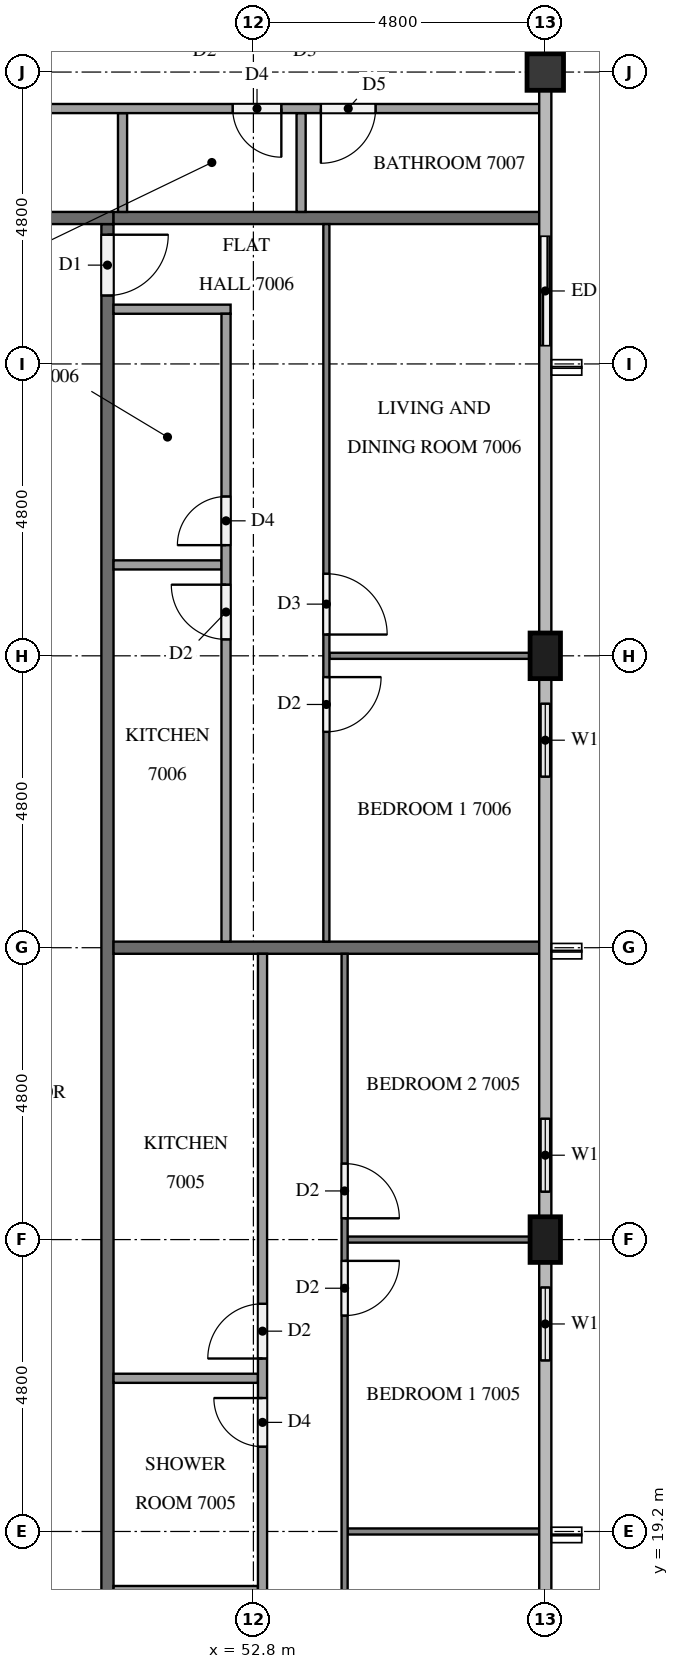
"""IFC4 building model, lengths in metres.
Left out: names, types, materials, properties, quantities, classifications, styles, units other than length and angle.
Written with IfcOpenShell. Run it as: python <this file> out.ifc"""

import sys

from ifc_helpers import new_model, si_unit, direction, frame, frame_2d, origin, origin_2d, place, context, subcontext, project, spatial, rectangle, extrude, element, fill, save


model = new_model("IFC4")
c1 = context("Model", 3, precision=1e-05, world=origin(), true_north=direction((0.0, 1.0)))
c2 = subcontext(c1, "Body", "Model", "MODEL_VIEW")
j1 = project(units=[si_unit("LENGTHUNIT", "METRE"), si_unit("PLANEANGLEUNIT", "RADIAN")], contexts=[c1])
p1 = place(None, origin())
s1 = spatial("IfcSite", under=j1, at=p1, CompositionType="ELEMENT")
p2 = place(p1, origin())
s2 = spatial("IfcBuilding", under=s1, at=p2, CompositionType="ELEMENT")
p3 = place(p2, frame((0.0, 0.0, 268.6)))
s3 = spatial("IfcBuildingStorey", under=s2, at=p3, CompositionType="ELEMENT", Elevation=268.6)
for number, where, z_axis, x_axis in (
    (1, (57.6, 24.0, 0.0), (0.0, 0.0, 1.0), (0.0, 1.0, 0.0)),
    (2, (57.6, 33.6, 0.0), (0.0, 0.0, 1.0), (0.0, 1.0, 0.0)),
):
    element("IfcColumn", number, at=place(p3, frame(where, z_axis=z_axis, x_axis=x_axis)), inside=s3, PredefinedType="COLUMN", context=c2, shape_type="SweptSolid", body=[
        extrude(rectangle(XDim=0.75, YDim=0.5, at=origin_2d()), origin(), (0.0, 0.0, 1.0), 3.2),
    ])
p4 = place(p3, frame((57.6, 43.2, 0.0), z_axis=(0.0, 0.0, 1.0), x_axis=(1.0, 0.0, 0.0)))
e3 = element("IfcColumn", 3, at=p4, inside=s3, PredefinedType="COLUMN", context=c2, shape_type="SweptSolid", body=[
    extrude(rectangle(XDim=0.6, YDim=0.6, at=origin_2d()), origin(), (0.0, 0.0, 1.0), 3.2),
])
p5 = place(p3, frame((57.6, 21.6, 0.0), z_axis=(0.0, 0.0, 1.0), x_axis=(0.0, 1.0, 0.0)))
e4 = element("IfcWall", 4, at=p5, inside=s3, PredefinedType="SOLIDWALL", context=c2, shape_type="SweptSolid", body=[
    extrude(rectangle(XDim=2.025, YDim=0.15, at=frame_2d((1.012, 0.0))), origin(), (0.0, 0.0, 1.0), 3.2),
])
p6 = place(p5, frame((0.413, 0.0, 0.9)))
e5 = element("IfcOpeningElement", 5, at=p6, cuts=e4, PredefinedType="OPENING", context=c2, shape_type="SweptSolid", body=[
    extrude(rectangle(XDim=1.2, YDim=1.4, at=frame_2d((0.6, 0.7))), frame((0.0, 0.085, 0.0), z_axis=(0.0, -1.0, 0.0), x_axis=(1.0, 0.0, 0.0)), (0.0, 0.0, 1.0), 0.17),
])
p7 = place(p3, frame((57.6, 24.375, 0.0), z_axis=(0.0, 0.0, 1.0), x_axis=(0.0, 1.0, 0.0)))
e6 = element("IfcWall", 6, at=p7, inside=s3, PredefinedType="SOLIDWALL", context=c2, shape_type="SweptSolid", body=[
    extrude(rectangle(XDim=2.025, YDim=0.15, at=frame_2d((1.012, 0.0))), origin(), (0.0, 0.0, 1.0), 3.2),
])
p8 = place(p7, frame((0.413, 0.0, 0.9)))
e7 = element("IfcOpeningElement", 7, at=p8, cuts=e6, PredefinedType="OPENING", context=c2, shape_type="SweptSolid", body=[
    extrude(rectangle(XDim=1.2, YDim=1.4, at=frame_2d((0.6, 0.7))), frame((0.0, 0.085, 0.0), z_axis=(0.0, -1.0, 0.0), x_axis=(1.0, 0.0, 0.0)), (0.0, 0.0, 1.0), 0.17),
])
p9 = place(p3, frame((57.6, 31.2, 0.0), z_axis=(0.0, 0.0, 1.0), x_axis=(0.0, 1.0, 0.0)))
e8 = element("IfcWall", 8, at=p9, inside=s3, PredefinedType="SOLIDWALL", context=c2, shape_type="SweptSolid", body=[
    extrude(rectangle(XDim=2.025, YDim=0.15, at=frame_2d((1.013, 0.0))), origin(), (0.0, 0.0, 1.0), 3.2),
])
p10 = place(p9, frame((0.413, 0.0, 0.9)))
e9 = element("IfcOpeningElement", 9, at=p10, cuts=e8, PredefinedType="OPENING", context=c2, shape_type="SweptSolid", body=[
    extrude(rectangle(XDim=1.2, YDim=1.4, at=frame_2d((0.6, 0.7))), frame((0.0, 0.085, 0.0), z_axis=(0.0, -1.0, 0.0), x_axis=(1.0, 0.0, 0.0)), (0.0, 0.0, 1.0), 0.17),
])
p11 = place(p3, frame((57.6, 38.4, 0.0), z_axis=(0.0, 0.0, 1.0), x_axis=(0.0, 1.0, 0.0)))
e10 = element("IfcWall", 10, at=p11, inside=s3, PredefinedType="SOLIDWALL", context=c2, shape_type="SweptSolid", body=[
    extrude(rectangle(XDim=2.4, YDim=0.15, at=frame_2d((1.2, 0.0))), origin(), (0.0, 0.0, 1.0), 3.2),
])
p12 = place(p11, frame((0.3, 0.0, 0.0)))
e11 = element("IfcOpeningElement", 11, at=p12, cuts=e10, PredefinedType="OPENING", context=c2, shape_type="SweptSolid", body=[
    extrude(rectangle(XDim=1.8, YDim=2.4, at=frame_2d((0.9, 1.2))), frame((0.0, 0.085, 0.0), z_axis=(0.0, -1.0, 0.0), x_axis=(1.0, 0.0, 0.0)), (0.0, 0.0, 1.0), 0.17),
])
p13 = place(p3, frame((50.4, 40.7, 0.0), z_axis=(0.0, 0.0, 1.0), x_axis=(0.0, -1.0, 0.0)))
e12 = element("IfcWall", 12, at=p13, inside=s3, PredefinedType="PARTITIONING", context=c2, shape_type="SweptSolid", body=[
    extrude(rectangle(XDim=28.6, YDim=0.2, at=frame_2d((14.3, 0.0))), origin(), (0.0, 0.0, 1.0), 3.2),
])
p14 = place(p13, frame((27.425, 0.0, 0.0)))
e13 = element("IfcOpeningElement", 13, at=p14, cuts=e12, PredefinedType="OPENING", context=c2, shape_type="SweptSolid", body=[
    extrude(rectangle(XDim=1.0, YDim=2.1, at=frame_2d((0.5, 1.05))), frame((0.0, 0.11, 0.0), z_axis=(0.0, -1.0, 0.0), x_axis=(1.0, 0.0, 0.0)), (0.0, 0.0, 1.0), 0.22),
])
p15 = place(p13, frame((0.175, 0.0, 0.0)))
e14 = element("IfcOpeningElement", 14, at=p15, cuts=e12, PredefinedType="OPENING", context=c2, shape_type="SweptSolid", body=[
    extrude(rectangle(XDim=1.0, YDim=2.1, at=frame_2d((0.5, 1.05))), frame((0.0, 0.11, 0.0), z_axis=(0.0, -1.0, 0.0), x_axis=(1.0, 0.0, 0.0)), (0.0, 0.0, 1.0), 0.22),
])
p16 = place(p3, frame((11.9, 40.8, 0.0), z_axis=(0.0, 0.0, 1.0), x_axis=(1.0, 0.0, 0.0)))
e15 = element("IfcWall", 15, at=p16, inside=s3, PredefinedType="PARTITIONING", context=c2, shape_type="SweptSolid", body=[
    extrude(rectangle(XDim=38.6, YDim=0.2, at=frame_2d((19.3, 0.0))), origin(), (0.0, 0.0, 1.0), 3.2),
])
p17 = place(p16, frame((31.575, 0.0, 0.0)))
e16 = element("IfcOpeningElement", 16, at=p17, cuts=e15, PredefinedType="OPENING", context=c2, shape_type="SweptSolid", body=[
    extrude(rectangle(XDim=1.0, YDim=2.1, at=frame_2d((0.5, 1.05))), frame((0.0, 0.11, 0.0), z_axis=(0.0, -1.0, 0.0), x_axis=(1.0, 0.0, 0.0)), (0.0, 0.0, 1.0), 0.22),
])
p18 = place(p16, frame((24.375, 0.0, 0.0)))
e17 = element("IfcOpeningElement", 17, at=p18, cuts=e15, PredefinedType="OPENING", context=c2, shape_type="SweptSolid", body=[
    extrude(rectangle(XDim=1.0, YDim=2.1, at=frame_2d((0.5, 1.05))), frame((0.0, 0.11, 0.0), z_axis=(0.0, -1.0, 0.0), x_axis=(1.0, 0.0, 0.0)), (0.0, 0.0, 1.0), 0.22),
])
p19 = place(p16, frame((22.825, 0.0, 0.0)))
e18 = element("IfcOpeningElement", 18, at=p19, cuts=e15, PredefinedType="OPENING", context=c2, shape_type="SweptSolid", body=[
    extrude(rectangle(XDim=1.0, YDim=2.1, at=frame_2d((0.5, 1.05))), frame((0.0, 0.11, 0.0), z_axis=(0.0, -1.0, 0.0), x_axis=(1.0, 0.0, 0.0)), (0.0, 0.0, 1.0), 0.22),
])
p20 = place(p16, frame((0.375, 0.0, 0.0)))
e19 = element("IfcOpeningElement", 19, at=p20, cuts=e15, PredefinedType="OPENING", context=c2, shape_type="SweptSolid", body=[
    extrude(rectangle(XDim=1.0, YDim=2.1, at=frame_2d((0.5, 1.05))), frame((0.0, 0.11, 0.0), z_axis=(0.0, -1.0, 0.0), x_axis=(1.0, 0.0, 0.0)), (0.0, 0.0, 1.0), 0.22),
])
for number, where, z_axis, x_axis in (
    (20, (50.5, 28.8, 0.0), (0.0, 0.0, 1.0), (1.0, 0.0, 0.0)),
    (21, (50.5, 40.8, 0.0), (0.0, 0.0, 1.0), (1.0, 0.0, 0.0)),
):
    element("IfcWall", number, at=place(p3, frame(where, z_axis=z_axis, x_axis=x_axis)), inside=s3, PredefinedType="PARTITIONING", context=c2, shape_type="SweptSolid", body=[
        extrude(rectangle(XDim=7.0, YDim=0.2, at=frame_2d((3.5, 0.0))), origin(), (0.0, 0.0, 1.0), 3.2),
    ])
p21 = place(p3, frame((54.35, 19.2, 0.0), z_axis=(0.0, 0.0, 1.0), x_axis=(1.0, 0.0, 0.0)))
e22 = element("IfcWall", 22, at=p21, inside=s3, PredefinedType="PARTITIONING", context=c2, shape_type="SweptSolid", body=[
    extrude(rectangle(XDim=3.15, YDim=0.1, at=frame_2d((1.575, 0.0))), origin(), (0.0, 0.0, 1.0), 3.2),
])
p22 = place(p3, frame((54.35, 24.0, 0.0), z_axis=(0.0, 0.0, 1.0), x_axis=(1.0, 0.0, 0.0)))
e23 = element("IfcWall", 23, at=p22, inside=s3, PredefinedType="PARTITIONING", context=c2, shape_type="SweptSolid", body=[
    extrude(rectangle(XDim=3.0, YDim=0.1, at=frame_2d((1.5, 0.0))), origin(), (0.0, 0.0, 1.0), 3.2),
])
p23 = place(p3, frame((54.3, 28.7, 0.0), z_axis=(0.0, 0.0, 1.0), x_axis=(0.0, -1.0, 0.0)))
e24 = element("IfcWall", 24, at=p23, inside=s3, PredefinedType="PARTITIONING", context=c2, shape_type="SweptSolid", body=[
    extrude(rectangle(XDim=16.6, YDim=0.1, at=frame_2d((8.3, 0.0))), origin(), (0.0, 0.0, 1.0), 3.2),
])
p24 = place(p23, frame((15.3, 0.0, 0.0)))
e25 = element("IfcOpeningElement", 25, at=p24, cuts=e24, PredefinedType="OPENING", context=c2, shape_type="SweptSolid", body=[
    extrude(rectangle(XDim=1.0, YDim=2.1, at=frame_2d((0.5, 1.05))), frame((0.0, 0.06, 0.0), z_axis=(0.0, -1.0, 0.0), x_axis=(1.0, 0.0, 0.0)), (0.0, 0.0, 1.0), 0.12),
])
p25 = place(p23, frame((5.05, 0.0, 0.0)))
e26 = element("IfcOpeningElement", 26, at=p25, cuts=e24, PredefinedType="OPENING", context=c2, shape_type="SweptSolid", body=[
    extrude(rectangle(XDim=0.9, YDim=2.1, at=frame_2d((0.45, 1.05))), frame((0.0, 0.06, 0.0), z_axis=(0.0, -1.0, 0.0), x_axis=(1.0, 0.0, 0.0)), (0.0, 0.0, 1.0), 0.12),
])
p26 = place(p23, frame((3.45, 0.0, 0.0)))
e27 = element("IfcOpeningElement", 27, at=p26, cuts=e24, PredefinedType="OPENING", context=c2, shape_type="SweptSolid", body=[
    extrude(rectangle(XDim=0.9, YDim=2.1, at=frame_2d((0.45, 1.05))), frame((0.0, 0.06, 0.0), z_axis=(0.0, -1.0, 0.0), x_axis=(1.0, 0.0, 0.0)), (0.0, 0.0, 1.0), 0.12),
])
for number, where, z_axis, x_axis in (
    (28, (50.5, 18.229, 0.0), (0.0, 0.0, 1.0), (1.0, 0.0, 0.0)),
    (29, (50.5, 21.719, 0.0), (0.0, 0.0, 1.0), (1.0, 0.0, 0.0)),
):
    element("IfcWall", number, at=place(p3, frame(where, z_axis=z_axis, x_axis=x_axis)), inside=s3, PredefinedType="PARTITIONING", context=c2, shape_type="SweptSolid", body=[
        extrude(rectangle(XDim=2.375, YDim=0.15, at=frame_2d((1.188, 0.0))), origin(), (0.0, 0.0, 1.0), 3.2),
    ])
p27 = place(p3, frame((52.95, 13.575, 0.0), z_axis=(0.0, 0.0, 1.0), x_axis=(0.0, 1.0, 0.0)))
e30 = element("IfcWall", 30, at=p27, inside=s3, PredefinedType="PARTITIONING", context=c2, shape_type="SweptSolid", body=[
    extrude(rectangle(XDim=15.125, YDim=0.15, at=frame_2d((7.562, 0.0))), origin(), (0.0, 0.0, 1.0), 3.2),
])
p28 = place(p27, frame((0.3, 0.0, 0.0)))
e31 = element("IfcOpeningElement", 31, at=p28, cuts=e30, PredefinedType="OPENING", context=c2, shape_type="SweptSolid", body=[
    extrude(rectangle(XDim=0.9, YDim=2.1, at=frame_2d((0.45, 1.05))), frame((0.0, 0.085, 0.0), z_axis=(0.0, -1.0, 0.0), x_axis=(1.0, 0.0, 0.0)), (0.0, 0.0, 1.0), 0.17),
])
p29 = place(p27, frame((7.019, 0.0, 0.0)))
e32 = element("IfcOpeningElement", 32, at=p29, cuts=e30, PredefinedType="OPENING", context=c2, shape_type="SweptSolid", body=[
    extrude(rectangle(XDim=0.8, YDim=2.1, at=frame_2d((0.4, 1.05))), frame((0.0, 0.085, 0.0), z_axis=(0.0, -1.0, 0.0), x_axis=(1.0, 0.0, 0.0)), (0.0, 0.0, 1.0), 0.17),
])
p30 = place(p27, frame((8.469, 0.0, 0.0)))
e33 = element("IfcOpeningElement", 33, at=p30, cuts=e30, PredefinedType="OPENING", context=c2, shape_type="SweptSolid", body=[
    extrude(rectangle(XDim=0.9, YDim=2.1, at=frame_2d((0.45, 1.05))), frame((0.0, 0.085, 0.0), z_axis=(0.0, -1.0, 0.0), x_axis=(1.0, 0.0, 0.0)), (0.0, 0.0, 1.0), 0.17),
])
p31 = place(p3, frame((54.05, 33.6, 0.0), z_axis=(0.0, 0.0, 1.0), x_axis=(1.0, 0.0, 0.0)))
e34 = element("IfcWall", 34, at=p31, inside=s3, PredefinedType="PARTITIONING", context=c2, shape_type="SweptSolid", body=[
    extrude(rectangle(XDim=3.3, YDim=0.1, at=frame_2d((1.65, 0.0))), origin(), (0.0, 0.0, 1.0), 3.2),
])
p32 = place(p3, frame((54.0, 40.7, 0.0), z_axis=(0.0, 0.0, 1.0), x_axis=(0.0, -1.0, 0.0)))
e35 = element("IfcWall", 35, at=p32, inside=s3, PredefinedType="PARTITIONING", context=c2, shape_type="SweptSolid", body=[
    extrude(rectangle(XDim=11.8, YDim=0.1, at=frame_2d((5.9, 0.0))), origin(), (0.0, 0.0, 1.0), 3.2),
])
p33 = place(p32, frame((5.75, 0.0, 0.0)))
e36 = element("IfcOpeningElement", 36, at=p33, cuts=e35, PredefinedType="OPENING", context=c2, shape_type="SweptSolid", body=[
    extrude(rectangle(XDim=1.0, YDim=2.1, at=frame_2d((0.5, 1.05))), frame((0.0, 0.06, 0.0), z_axis=(0.0, -1.0, 0.0), x_axis=(1.0, 0.0, 0.0)), (0.0, 0.0, 1.0), 0.12),
])
p34 = place(p32, frame((7.45, 0.0, 0.0)))
e37 = element("IfcOpeningElement", 37, at=p34, cuts=e35, PredefinedType="OPENING", context=c2, shape_type="SweptSolid", body=[
    extrude(rectangle(XDim=0.9, YDim=2.1, at=frame_2d((0.45, 1.05))), frame((0.0, 0.06, 0.0), z_axis=(0.0, -1.0, 0.0), x_axis=(1.0, 0.0, 0.0)), (0.0, 0.0, 1.0), 0.12),
])
p35 = place(p3, frame((50.5, 35.095, 0.0), z_axis=(0.0, 0.0, 1.0), x_axis=(1.0, 0.0, 0.0)))
e38 = element("IfcWall", 38, at=p35, inside=s3, PredefinedType="PARTITIONING", context=c2, shape_type="SweptSolid", body=[
    extrude(rectangle(XDim=1.775, YDim=0.15, at=frame_2d((0.887, 0.0))), origin(), (0.0, 0.0, 1.0), 3.2),
])
p36 = place(p3, frame((50.5, 39.3, 0.0), z_axis=(0.0, 0.0, 1.0), x_axis=(1.0, 0.0, 0.0)))
e39 = element("IfcWall", 39, at=p36, inside=s3, PredefinedType="PARTITIONING", context=c2, shape_type="SweptSolid", body=[
    extrude(rectangle(XDim=1.925, YDim=0.15, at=frame_2d((0.962, 0.0))), origin(), (0.0, 0.0, 1.0), 3.2),
])
p37 = place(p3, frame((52.35, 28.9, 0.0), z_axis=(0.0, 0.0, 1.0), x_axis=(0.0, 1.0, 0.0)))
e40 = element("IfcWall", 40, at=p37, inside=s3, PredefinedType="PARTITIONING", context=c2, shape_type="SweptSolid", body=[
    extrude(rectangle(XDim=10.325, YDim=0.15, at=frame_2d((5.163, 0.0))), origin(), (0.0, 0.0, 1.0), 3.2),
])
p38 = place(p37, frame((6.52, 0.0, 0.0)))
e41 = element("IfcOpeningElement", 41, at=p38, cuts=e40, PredefinedType="OPENING", context=c2, shape_type="SweptSolid", body=[
    extrude(rectangle(XDim=0.8, YDim=2.1, at=frame_2d((0.4, 1.05))), frame((0.0, 0.085, 0.0), z_axis=(0.0, -1.0, 0.0), x_axis=(1.0, 0.0, 0.0)), (0.0, 0.0, 1.0), 0.17),
])
p39 = place(p37, frame((4.97, 0.0, 0.0)))
e42 = element("IfcOpeningElement", 42, at=p39, cuts=e40, PredefinedType="OPENING", context=c2, shape_type="SweptSolid", body=[
    extrude(rectangle(XDim=0.9, YDim=2.1, at=frame_2d((0.45, 1.05))), frame((0.0, 0.085, 0.0), z_axis=(0.0, -1.0, 0.0), x_axis=(1.0, 0.0, 0.0)), (0.0, 0.0, 1.0), 0.17),
])
for number, where, z_axis, x_axis in (
    (43, (50.648, 40.9, 0.0), (0.0, 0.0, 1.0), (0.0, 1.0, 0.0)),
    (44, (53.585, 40.9, 0.0), (0.0, 0.0, 1.0), (0.0, 1.0, 0.0)),
):
    element("IfcWall", number, at=place(p3, frame(where, z_axis=z_axis, x_axis=x_axis)), inside=s3, PredefinedType="PARTITIONING", context=c2, shape_type="SweptSolid", body=[
        extrude(rectangle(XDim=1.625, YDim=0.15, at=frame_2d((0.812, 0.0))), origin(), (0.0, 0.0, 1.0), 3.2),
    ])
p40 = place(p3, frame((57.5, 42.6, 0.0), z_axis=(0.0, 0.0, 1.0), x_axis=(-1.0, 0.0, 0.0)))
e45 = element("IfcWall", 45, at=p40, inside=s3, PredefinedType="PARTITIONING", context=c2, shape_type="SweptSolid", body=[
    extrude(rectangle(XDim=12.725, YDim=0.15, at=frame_2d((6.363, 0.0))), origin(), (0.0, 0.0, 1.0), 3.2),
])
p41 = place(p40, frame((11.525, 0.0, 0.0)))
e46 = element("IfcOpeningElement", 46, at=p41, cuts=e45, PredefinedType="OPENING", context=c2, shape_type="SweptSolid", body=[
    extrude(rectangle(XDim=0.9, YDim=2.1, at=frame_2d((0.45, 1.05))), frame((0.0, 0.085, 0.0), z_axis=(0.0, -1.0, 0.0), x_axis=(1.0, 0.0, 0.0)), (0.0, 0.0, 1.0), 0.17),
])
p42 = place(p40, frame((4.24, 0.0, 0.0)))
e47 = element("IfcOpeningElement", 47, at=p42, cuts=e45, PredefinedType="OPENING", context=c2, shape_type="SweptSolid", body=[
    extrude(rectangle(XDim=0.8, YDim=2.1, at=frame_2d((0.4, 1.05))), frame((0.0, 0.085, 0.0), z_axis=(0.0, -1.0, 0.0), x_axis=(1.0, 0.0, 0.0)), (0.0, 0.0, 1.0), 0.17),
])
p43 = place(p40, frame((2.69, 0.0, 0.0)))
e48 = element("IfcOpeningElement", 48, at=p43, cuts=e45, PredefinedType="OPENING", context=c2, shape_type="SweptSolid", body=[
    extrude(rectangle(XDim=0.9, YDim=2.1, at=frame_2d((0.45, 1.05))), frame((0.0, 0.085, 0.0), z_axis=(0.0, -1.0, 0.0), x_axis=(1.0, 0.0, 0.0)), (0.0, 0.0, 1.0), 0.17),
])
p44 = place(p6, origin())
e49 = element("IfcWindow", 49, at=p44, inside=s3, PartitioningType="SINGLE_PANEL", PredefinedType="WINDOW", context=c2, shape_type="SweptSolid", body=[
    extrude(rectangle(XDim=1.2, YDim=1.4, at=frame_2d((0.6, 0.7))), frame((0.0, 0.03, 0.0), z_axis=(0.0, -1.0, 0.0), x_axis=(1.0, 0.0, 0.0)), (0.0, 0.0, 1.0), 0.06),
])
fill(e5, e49)
p45 = place(p8, origin())
e50 = element("IfcWindow", 50, at=p45, inside=s3, PartitioningType="SINGLE_PANEL", PredefinedType="WINDOW", context=c2, shape_type="SweptSolid", body=[
    extrude(rectangle(XDim=1.2, YDim=1.4, at=frame_2d((0.6, 0.7))), frame((0.0, 0.03, 0.0), z_axis=(0.0, -1.0, 0.0), x_axis=(1.0, 0.0, 0.0)), (0.0, 0.0, 1.0), 0.06),
])
fill(e7, e50)
p46 = place(p10, origin())
e51 = element("IfcWindow", 51, at=p46, inside=s3, PartitioningType="SINGLE_PANEL", PredefinedType="WINDOW", context=c2, shape_type="SweptSolid", body=[
    extrude(rectangle(XDim=1.2, YDim=1.4, at=frame_2d((0.6, 0.7))), frame((0.0, 0.03, 0.0), z_axis=(0.0, -1.0, 0.0), x_axis=(1.0, 0.0, 0.0)), (0.0, 0.0, 1.0), 0.06),
])
fill(e9, e51)
p47 = place(p12, origin())
e52 = element("IfcDoor", 52, at=p47, inside=s3, OperationType="SLIDING_TO_LEFT", PredefinedType="DOOR", context=c2, shape_type="SweptSolid", body=[
    extrude(rectangle(XDim=1.8, YDim=2.4, at=frame_2d((0.9, 1.2))), frame((0.0, 0.025, 0.0), z_axis=(0.0, -1.0, 0.0), x_axis=(1.0, 0.0, 0.0)), (0.0, 0.0, 1.0), 0.05),
])
fill(e11, e52)
p48 = place(p15, origin())
e53 = element("IfcDoor", 53, at=p48, inside=s3, OperationType="SINGLE_SWING_LEFT", PredefinedType="DOOR", context=c2, shape_type="SweptSolid", body=[
    extrude(rectangle(XDim=1.0, YDim=2.1, at=frame_2d((0.5, 1.05))), frame((0.0, 0.025, 0.0), z_axis=(0.0, -1.0, 0.0), x_axis=(1.0, 0.0, 0.0)), (0.0, 0.0, 1.0), 0.05),
])
fill(e14, e53)
p49 = place(p25, origin())
e54 = element("IfcDoor", 54, at=p49, inside=s3, OperationType="SINGLE_SWING_LEFT", PredefinedType="DOOR", context=c2, shape_type="SweptSolid", body=[
    extrude(rectangle(XDim=0.9, YDim=2.1, at=frame_2d((0.45, 1.05))), frame((0.0, 0.025, 0.0), z_axis=(0.0, -1.0, 0.0), x_axis=(1.0, 0.0, 0.0)), (0.0, 0.0, 1.0), 0.05),
])
fill(e26, e54)
p50 = place(p26, origin())
e55 = element("IfcDoor", 55, at=p50, inside=s3, OperationType="SINGLE_SWING_RIGHT", PredefinedType="DOOR", context=c2, shape_type="SweptSolid", body=[
    extrude(rectangle(XDim=0.9, YDim=2.1, at=frame_2d((0.45, 1.05))), frame((0.0, 0.025, 0.0), z_axis=(0.0, -1.0, 0.0), x_axis=(1.0, 0.0, 0.0)), (0.0, 0.0, 1.0), 0.05),
])
fill(e27, e55)
p51 = place(p29, origin())
e56 = element("IfcDoor", 56, at=p51, inside=s3, OperationType="SINGLE_SWING_RIGHT", PredefinedType="DOOR", context=c2, shape_type="SweptSolid", body=[
    extrude(rectangle(XDim=0.8, YDim=2.1, at=frame_2d((0.4, 1.05))), frame((0.0, 0.025, 0.0), z_axis=(0.0, -1.0, 0.0), x_axis=(1.0, 0.0, 0.0)), (0.0, 0.0, 1.0), 0.05),
])
fill(e32, e56)
p52 = place(p30, origin())
e57 = element("IfcDoor", 57, at=p52, inside=s3, OperationType="SINGLE_SWING_LEFT", PredefinedType="DOOR", context=c2, shape_type="SweptSolid", body=[
    extrude(rectangle(XDim=0.9, YDim=2.1, at=frame_2d((0.45, 1.05))), frame((0.0, 0.025, 0.0), z_axis=(0.0, -1.0, 0.0), x_axis=(1.0, 0.0, 0.0)), (0.0, 0.0, 1.0), 0.05),
])
fill(e33, e57)
p53 = place(p33, origin())
e58 = element("IfcDoor", 58, at=p53, inside=s3, OperationType="SINGLE_SWING_RIGHT", PredefinedType="DOOR", context=c2, shape_type="SweptSolid", body=[
    extrude(rectangle(XDim=1.0, YDim=2.1, at=frame_2d((0.5, 1.05))), frame((0.0, 0.025, 0.0), z_axis=(0.0, -1.0, 0.0), x_axis=(1.0, 0.0, 0.0)), (0.0, 0.0, 1.0), 0.05),
])
fill(e36, e58)
p54 = place(p34, origin())
e59 = element("IfcDoor", 59, at=p54, inside=s3, OperationType="SINGLE_SWING_LEFT", PredefinedType="DOOR", context=c2, shape_type="SweptSolid", body=[
    extrude(rectangle(XDim=0.9, YDim=2.1, at=frame_2d((0.45, 1.05))), frame((0.0, 0.025, 0.0), z_axis=(0.0, -1.0, 0.0), x_axis=(1.0, 0.0, 0.0)), (0.0, 0.0, 1.0), 0.05),
])
fill(e37, e59)
p55 = place(p38, origin())
e60 = element("IfcDoor", 60, at=p55, inside=s3, OperationType="SINGLE_SWING_LEFT", PredefinedType="DOOR", context=c2, shape_type="SweptSolid", body=[
    extrude(rectangle(XDim=0.8, YDim=2.1, at=frame_2d((0.4, 1.05))), frame((0.0, 0.025, 0.0), z_axis=(0.0, -1.0, 0.0), x_axis=(1.0, 0.0, 0.0)), (0.0, 0.0, 1.0), 0.05),
])
fill(e41, e60)
p56 = place(p39, origin())
e61 = element("IfcDoor", 61, at=p56, inside=s3, OperationType="SINGLE_SWING_RIGHT", PredefinedType="DOOR", context=c2, shape_type="SweptSolid", body=[
    extrude(rectangle(XDim=0.9, YDim=2.1, at=frame_2d((0.45, 1.05))), frame((0.0, 0.025, 0.0), z_axis=(0.0, -1.0, 0.0), x_axis=(1.0, 0.0, 0.0)), (0.0, 0.0, 1.0), 0.05),
])
fill(e42, e61)
p57 = place(p42, origin())
e62 = element("IfcDoor", 62, at=p57, inside=s3, OperationType="SINGLE_SWING_LEFT", PredefinedType="DOOR", context=c2, shape_type="SweptSolid", body=[
    extrude(rectangle(XDim=0.8, YDim=2.1, at=frame_2d((0.4, 1.05))), frame((0.0, 0.025, 0.0), z_axis=(0.0, -1.0, 0.0), x_axis=(1.0, 0.0, 0.0)), (0.0, 0.0, 1.0), 0.05),
])
fill(e47, e62)
p58 = place(p43, origin())
e63 = element("IfcDoor", 63, at=p58, inside=s3, OperationType="SINGLE_SWING_RIGHT", PredefinedType="DOOR", context=c2, shape_type="SweptSolid", body=[
    extrude(rectangle(XDim=0.9, YDim=2.1, at=frame_2d((0.45, 1.05))), frame((0.0, 0.025, 0.0), z_axis=(0.0, -1.0, 0.0), x_axis=(1.0, 0.0, 0.0)), (0.0, 0.0, 1.0), 0.05),
])
fill(e48, e63)
save(model, sys.argv[1])
